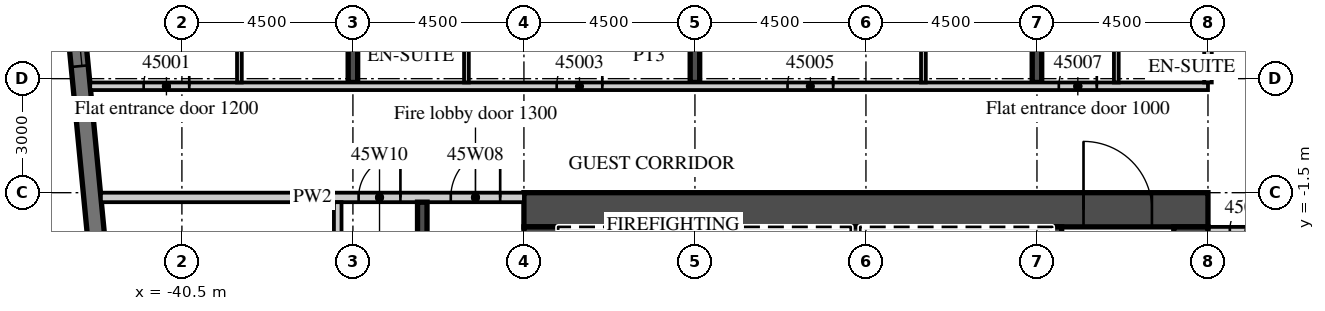
"""IFC4 building model, lengths in metres.
Left out: names, types, materials, properties, quantities, classifications, styles, units other than length and angle.
Written with IfcOpenShell. Run it as: python <this file> out.ifc"""

import sys

from ifc_helpers import new_model, si_unit, direction, frame, frame_2d, origin, place, context, subcontext, project, spatial, rectangle, extrude, element, fill, save


model = new_model("IFC4")
c1 = context("Model", 3, precision=1e-05, world=origin(), true_north=direction((0.0, 1.0)))
c2 = subcontext(c1, "Body", "Model", "MODEL_VIEW")
j1 = project(units=[si_unit("LENGTHUNIT", "METRE"), si_unit("PLANEANGLEUNIT", "RADIAN")], contexts=[c1])
p1 = place(None, origin())
s1 = spatial("IfcSite", under=j1, at=p1, CompositionType="ELEMENT")
p2 = place(p1, origin())
s2 = spatial("IfcBuilding", under=s1, at=p2, CompositionType="ELEMENT")
p3 = place(p2, frame((0.0, 0.0, 190.0)))
s3 = spatial("IfcBuildingStorey", under=s2, at=p3, CompositionType="ELEMENT", Elevation=190.0)
p4 = place(p3, frame((-36.0, 1.4, 0.0), z_axis=(0.0, 0.0, 1.0), x_axis=(0.0, 1.0, 0.0)))
e1 = element("IfcWall", 1, at=p4, inside=s3, PredefinedType="SHEAR", context=c2, shape_type="SweptSolid", body=[
    extrude(rectangle(XDim=15.401, YDim=0.25, at=frame_2d((7.701, 0.0))), origin(), (0.0, 0.0, 1.0), 3.3),
])
p5 = place(p3, frame((-27.0, 1.4, 0.0), z_axis=(0.0, 0.0, 1.0), x_axis=(0.0, 1.0, 0.0)))
e2 = element("IfcWall", 2, at=p5, inside=s3, PredefinedType="SHEAR", context=c2, shape_type="SweptSolid", body=[
    extrude(rectangle(XDim=16.268, YDim=0.25, at=frame_2d((8.134, 0.0))), origin(), (0.0, 0.0, 1.0), 3.3),
])
p6 = place(p3, frame((-18.0, 1.4, 0.0), z_axis=(0.0, 0.0, 1.0), x_axis=(0.0, 1.0, 0.0)))
e3 = element("IfcWall", 3, at=p6, inside=s3, PredefinedType="SHEAR", context=c2, shape_type="SweptSolid", body=[
    extrude(rectangle(XDim=17.134, YDim=0.25, at=frame_2d((8.567, 0.0))), origin(), (0.0, 0.0, 1.0), 3.3),
])
p7 = place(p3, frame((-44.214, 12.466, 0.0), z_axis=(0.0, 0.0, 1.0), x_axis=(0.095847314626, -0.995396047952, 0.0)))
e4 = element("IfcWall", 4, at=p7, inside=s3, PredefinedType="SOLIDWALL", context=c2, shape_type="SweptSolid", body=[
    extrude(rectangle(XDim=34.0, YDim=0.45, at=frame_2d((17.0, 0.0))), origin(), (0.0, 0.0, 1.0), 3.02),
])
p8 = place(p7, frame((2.865, 0.0, 0.45)))
e5 = element("IfcOpeningElement", 5, at=p8, cuts=e4, PredefinedType="OPENING", context=c2, shape_type="SweptSolid", body=[
    extrude(rectangle(XDim=3.3, YDim=2.25, at=frame_2d((1.65, 1.125))), frame((0.0, 0.235, 0.0), z_axis=(0.0, -1.0, 0.0), x_axis=(1.0, 0.0, 0.0)), (0.0, 0.0, 1.0), 0.47),
])
p9 = place(p7, frame((7.386, 0.0, 0.45)))
e6 = element("IfcOpeningElement", 6, at=p9, cuts=e4, PredefinedType="OPENING", context=c2, shape_type="SweptSolid", body=[
    extrude(rectangle(XDim=3.3, YDim=2.25, at=frame_2d((1.65, 1.125))), frame((0.0, 0.235, 0.0), z_axis=(0.0, -1.0, 0.0), x_axis=(1.0, 0.0, 0.0)), (0.0, 0.0, 1.0), 0.47),
])
p10 = place(p3, frame((-42.913, 1.3, 0.0), z_axis=(0.0, 0.0, 1.0), x_axis=(1.0, 0.0, 0.0)))
e7 = element("IfcWall", 7, at=p10, inside=s3, PredefinedType="PARTITIONING", context=c2, shape_type="SweptSolid", body=[
    extrude(rectangle(XDim=29.413, YDim=0.2, at=frame_2d((14.707, 0.0))), origin(), (0.0, 0.0, 1.0), 3.02),
])
p11 = place(p10, frame((1.406, 0.0, 0.0)))
e8 = element("IfcOpeningElement", 8, at=p11, cuts=e7, PredefinedType="OPENING", context=c2, shape_type="SweptSolid", body=[
    extrude(rectangle(XDim=1.2, YDim=2.1, at=frame_2d((0.6, 1.05))), frame((0.0, 0.11, 0.0), z_axis=(0.0, -1.0, 0.0), x_axis=(1.0, 0.0, 0.0)), (0.0, 0.0, 1.0), 0.22),
])
p12 = place(p10, frame((12.275, 0.0, 0.0)))
e9 = element("IfcOpeningElement", 9, at=p12, cuts=e7, PredefinedType="OPENING", context=c2, shape_type="SweptSolid", body=[
    extrude(rectangle(XDim=1.2, YDim=2.1, at=frame_2d((0.6, 1.05))), frame((0.0, 0.11, 0.0), z_axis=(0.0, -1.0, 0.0), x_axis=(1.0, 0.0, 0.0)), (0.0, 0.0, 1.0), 0.22),
])
p13 = place(p10, frame((18.35, 0.0, 0.0)))
e10 = element("IfcOpeningElement", 10, at=p13, cuts=e7, PredefinedType="OPENING", context=c2, shape_type="SweptSolid", body=[
    extrude(rectangle(XDim=1.2, YDim=2.1, at=frame_2d((0.6, 1.05))), frame((0.0, 0.11, 0.0), z_axis=(0.0, -1.0, 0.0), x_axis=(1.0, 0.0, 0.0)), (0.0, 0.0, 1.0), 0.22),
])
p14 = place(p10, frame((25.488, 0.0, 0.0)))
e11 = element("IfcOpeningElement", 11, at=p14, cuts=e7, PredefinedType="OPENING", context=c2, shape_type="SweptSolid", body=[
    extrude(rectangle(XDim=1.0, YDim=2.1, at=frame_2d((0.5, 1.05))), frame((0.0, 0.11, 0.0), z_axis=(0.0, -1.0, 0.0), x_axis=(1.0, 0.0, 0.0)), (0.0, 0.0, 1.0), 0.22),
])
p15 = place(p3, frame((-38.987, 1.4, 0.0), z_axis=(0.0, 0.0, 1.0), x_axis=(0.0, 1.0, 0.0)))
e12 = element("IfcWall", 12, at=p15, inside=s3, PredefinedType="PARTITIONING", context=c2, shape_type="SweptSolid", body=[
    extrude(rectangle(XDim=3.725, YDim=0.125, at=frame_2d((1.863, 0.0))), origin(), (0.0, 0.0, 1.0), 3.02),
])
p16 = place(p15, frame((2.45, 0.0, 0.0)))
e13 = element("IfcOpeningElement", 13, at=p16, cuts=e12, PredefinedType="OPENING", context=c2, shape_type="SweptSolid", body=[
    extrude(rectangle(XDim=0.9, YDim=2.1, at=frame_2d((0.45, 1.05))), frame((0.0, 0.073, 0.0), z_axis=(0.0, -1.0, 0.0), x_axis=(1.0, 0.0, 0.0)), (0.0, 0.0, 1.0), 0.145),
])
p17 = place(p3, frame((-33.013, 1.4, 0.0), z_axis=(0.0, 0.0, 1.0), x_axis=(0.0, 1.0, 0.0)))
e14 = element("IfcWall", 14, at=p17, inside=s3, PredefinedType="PARTITIONING", context=c2, shape_type="SweptSolid", body=[
    extrude(rectangle(XDim=3.725, YDim=0.125, at=frame_2d((1.863, 0.0))), origin(), (0.0, 0.0, 1.0), 3.02),
])
p18 = place(p17, frame((2.45, 0.0, 0.0)))
e15 = element("IfcOpeningElement", 15, at=p18, cuts=e14, PredefinedType="OPENING", context=c2, shape_type="SweptSolid", body=[
    extrude(rectangle(XDim=0.9, YDim=2.1, at=frame_2d((0.45, 1.05))), frame((0.0, 0.073, 0.0), z_axis=(0.0, -1.0, 0.0), x_axis=(1.0, 0.0, 0.0)), (0.0, 0.0, 1.0), 0.145),
])
p19 = place(p3, frame((-20.988, 1.4, 0.0), z_axis=(0.0, 0.0, 1.0), x_axis=(0.0, 1.0, 0.0)))
e16 = element("IfcWall", 16, at=p19, inside=s3, PredefinedType="PARTITIONING", context=c2, shape_type="SweptSolid", body=[
    extrude(rectangle(XDim=3.725, YDim=0.125, at=frame_2d((1.863, 0.0))), origin(), (0.0, 0.0, 1.0), 3.02),
])
p20 = place(p19, frame((2.45, 0.0, 0.0)))
e17 = element("IfcOpeningElement", 17, at=p20, cuts=e16, PredefinedType="OPENING", context=c2, shape_type="SweptSolid", body=[
    extrude(rectangle(XDim=0.9, YDim=2.1, at=frame_2d((0.45, 1.05))), frame((0.0, 0.073, 0.0), z_axis=(0.0, -1.0, 0.0), x_axis=(1.0, 0.0, 0.0)), (0.0, 0.0, 1.0), 0.145),
])
p21 = place(p3, frame((-13.5, 1.4, 0.0), z_axis=(0.0, 0.0, 1.0), x_axis=(0.0, 1.0, 0.0)))
e18 = element("IfcWall", 18, at=p21, inside=s3, PredefinedType="PARTITIONING", context=c2, shape_type="SweptSolid", body=[
    extrude(rectangle(XDim=17.59, YDim=0.2, at=frame_2d((8.795, 0.0))), origin(), (0.0, 0.0, 1.0), 3.02),
])
p22 = place(p3, frame((-15.912, 1.4, 0.0), z_axis=(0.0, 0.0, 1.0), x_axis=(0.0, 1.0, 0.0)))
e19 = element("IfcWall", 19, at=p22, inside=s3, PredefinedType="PARTITIONING", context=c2, shape_type="SweptSolid", body=[
    extrude(rectangle(XDim=3.725, YDim=0.125, at=frame_2d((1.863, 0.0))), origin(), (0.0, 0.0, 1.0), 3.02),
])
p23 = place(p22, frame((2.45, 0.0, 0.0)))
e20 = element("IfcOpeningElement", 20, at=p23, cuts=e19, PredefinedType="OPENING", context=c2, shape_type="SweptSolid", body=[
    extrude(rectangle(XDim=0.9, YDim=2.1, at=frame_2d((0.45, 1.05))), frame((0.0, 0.073, 0.0), z_axis=(0.0, -1.0, 0.0), x_axis=(1.0, 0.0, 0.0)), (0.0, 0.0, 1.0), 0.145),
])
p24 = place(p3, frame((-13.5, -2.5, 0.0), z_axis=(0.0, 0.0, 1.0), x_axis=(1.0, 0.0, 0.0)))
e21 = element("IfcWall", 21, at=p24, inside=s3, PredefinedType="PARTITIONING", context=c2, shape_type="SweptSolid", body=[
    extrude(rectangle(XDim=27.0, YDim=0.2, at=frame_2d((13.5, 0.0))), origin(), (0.0, 0.0, 1.0), 3.02),
])
p25 = place(p24, frame((0.575, 0.0, 0.0)))
e22 = element("IfcOpeningElement", 22, at=p25, cuts=e21, PredefinedType="OPENING", context=c2, shape_type="SweptSolid", body=[
    extrude(rectangle(XDim=1.0, YDim=2.1, at=frame_2d((0.5, 1.05))), frame((0.0, 0.11, 0.0), z_axis=(0.0, -1.0, 0.0), x_axis=(1.0, 0.0, 0.0)), (0.0, 0.0, 1.0), 0.22),
])
p26 = place(p24, frame((7.45, 0.0, 0.0)))
e23 = element("IfcOpeningElement", 23, at=p26, cuts=e21, PredefinedType="OPENING", context=c2, shape_type="SweptSolid", body=[
    extrude(rectangle(XDim=1.0, YDim=2.1, at=frame_2d((0.5, 1.05))), frame((0.0, 0.11, 0.0), z_axis=(0.0, -1.0, 0.0), x_axis=(1.0, 0.0, 0.0)), (0.0, 0.0, 1.0), 0.22),
])
p27 = place(p24, frame((9.55, 0.0, 0.0)))
e24 = element("IfcOpeningElement", 24, at=p27, cuts=e21, PredefinedType="OPENING", context=c2, shape_type="SweptSolid", body=[
    extrude(rectangle(XDim=1.0, YDim=2.1, at=frame_2d((0.5, 1.05))), frame((0.0, 0.11, 0.0), z_axis=(0.0, -1.0, 0.0), x_axis=(1.0, 0.0, 0.0)), (0.0, 0.0, 1.0), 0.22),
])
p28 = place(p24, frame((18.862, 0.0, 0.0)))
e25 = element("IfcOpeningElement", 25, at=p28, cuts=e21, PredefinedType="OPENING", context=c2, shape_type="SweptSolid", body=[
    extrude(rectangle(XDim=1.2, YDim=2.1, at=frame_2d((0.6, 1.05))), frame((0.0, 0.11, 0.0), z_axis=(0.0, -1.0, 0.0), x_axis=(1.0, 0.0, 0.0)), (0.0, 0.0, 1.0), 0.22),
])
p29 = place(p24, frame((23.075, 0.0, 0.0)))
e26 = element("IfcOpeningElement", 26, at=p29, cuts=e21, PredefinedType="OPENING", context=c2, shape_type="SweptSolid", body=[
    extrude(rectangle(XDim=1.0, YDim=2.1, at=frame_2d((0.5, 1.05))), frame((0.0, 0.11, 0.0), z_axis=(0.0, -1.0, 0.0), x_axis=(1.0, 0.0, 0.0)), (0.0, 0.0, 1.0), 0.22),
])
p30 = place(p3, frame((-31.5, -1.95, 0.0), z_axis=(0.0, 0.0, 1.0), x_axis=(1.0, 0.0, 0.0)))
e27 = element("IfcWall", 27, at=p30, inside=s3, PredefinedType="SHEAR", context=c2, shape_type="SweptSolid", body=[
    extrude(rectangle(XDim=18.0, YDim=0.9, at=frame_2d((9.0, 0.0))), origin(), (0.0, 0.0, 1.0), 3.02),
])
p31 = place(p30, frame((14.725, 0.0, 0.0)))
e28 = element("IfcOpeningElement", 28, at=p31, cuts=e27, PredefinedType="OPENING", context=c2, shape_type="SweptSolid", body=[
    extrude(rectangle(XDim=1.8, YDim=2.1, at=frame_2d((0.9, 1.05))), frame((0.0, 0.46, 0.0), z_axis=(0.0, -1.0, 0.0), x_axis=(1.0, 0.0, 0.0)), (0.0, 0.0, 1.0), 0.92),
])
p32 = place(p3, frame((-31.05, -15.2, 0.0), z_axis=(0.0, 0.0, 1.0), x_axis=(0.0, 1.0, 0.0)))
e29 = element("IfcWall", 29, at=p32, inside=s3, PredefinedType="SHEAR", context=c2, shape_type="SweptSolid", body=[
    extrude(rectangle(XDim=12.8, YDim=0.9, at=frame_2d((6.4, 0.0))), origin(), (0.0, 0.0, 1.0), 3.02),
])
p33 = place(p32, frame((11.5, 0.0, 0.0)))
e30 = element("IfcOpeningElement", 30, at=p33, cuts=e29, PredefinedType="OPENING", context=c2, shape_type="SweptSolid", body=[
    extrude(rectangle(XDim=1.1, YDim=2.1, at=frame_2d((0.55, 1.05))), frame((0.0, 0.46, 0.0), z_axis=(0.0, -1.0, 0.0), x_axis=(1.0, 0.0, 0.0)), (0.0, 0.0, 1.0), 0.92),
])
p34 = place(p3, frame((-13.95, -14.6, 0.0), z_axis=(0.0, 0.0, 1.0), x_axis=(0.0, 1.0, 0.0)))
e31 = element("IfcWall", 31, at=p34, inside=s3, PredefinedType="SHEAR", context=c2, shape_type="SweptSolid", body=[
    extrude(rectangle(XDim=12.2, YDim=0.9, at=frame_2d((6.1, 0.0))), origin(), (0.0, 0.0, 1.0), 3.02),
])
p35 = place(p3, frame((-17.475, -5.55, 0.0), z_axis=(0.0, 0.0, 1.0), x_axis=(0.0, 1.0, 0.0)))
e32 = element("IfcWall", 32, at=p35, inside=s3, PredefinedType="SHEAR", context=c2, shape_type="SweptSolid", body=[
    extrude(rectangle(XDim=3.15, YDim=0.25, at=frame_2d((1.575, 0.0))), origin(), (0.0, 0.0, 1.0), 3.02),
])
for number, where, z_axis, x_axis in (
    (33, (-27.975, -5.3, 0.0), (0.0, 0.0, 1.0), (0.0, 1.0, 0.0)),
    (34, (-22.775, -5.3, 0.0), (0.0, 0.0, 1.0), (0.0, 1.0, 0.0)),
):
    element("IfcWall", number, at=place(p3, frame(where, z_axis=z_axis, x_axis=x_axis)), inside=s3, PredefinedType="SHEAR", context=c2, shape_type="SweptSolid", body=[
        extrude(rectangle(XDim=2.9, YDim=0.25, at=frame_2d((1.45, 0.0))), origin(), (0.0, 0.0, 1.0), 3.02),
    ])
p36 = place(p3, frame((-42.632, -1.625, 0.0), z_axis=(0.0, 0.0, 1.0), x_axis=(1.0, 0.0, 0.0)))
e35 = element("IfcWall", 35, at=p36, inside=s3, PredefinedType="PARTITIONING", context=c2, shape_type="SweptSolid", body=[
    extrude(rectangle(XDim=11.132, YDim=0.25, at=frame_2d((5.566, 0.0))), origin(), (0.0, 0.0, 1.0), 3.02),
])
p37 = place(p36, frame((9.207, 0.0, 0.0)))
e36 = element("IfcOpeningElement", 36, at=p37, cuts=e35, PredefinedType="OPENING", context=c2, shape_type="SweptSolid", body=[
    extrude(rectangle(XDim=1.3, YDim=2.1, at=frame_2d((0.65, 1.05))), frame((0.0, 0.135, 0.0), z_axis=(0.0, -1.0, 0.0), x_axis=(1.0, 0.0, 0.0)), (0.0, 0.0, 1.0), 0.27),
])
p38 = place(p36, frame((6.781, 0.0, 0.0)))
e37 = element("IfcOpeningElement", 37, at=p38, cuts=e35, PredefinedType="OPENING", context=c2, shape_type="SweptSolid", body=[
    extrude(rectangle(XDim=1.1, YDim=2.1, at=frame_2d((0.55, 1.05))), frame((0.0, 0.135, 0.0), z_axis=(0.0, -1.0, 0.0), x_axis=(1.0, 0.0, 0.0)), (0.0, 0.0, 1.0), 0.27),
])
p39 = place(p3, frame((-34.175, -10.1, 0.0), z_axis=(0.0, 0.0, 1.0), x_axis=(0.0, 1.0, 0.0)))
e38 = element("IfcWall", 38, at=p39, inside=s3, PredefinedType="SHEAR", context=c2, shape_type="SweptSolid", body=[
    extrude(rectangle(XDim=8.35, YDim=0.25, at=frame_2d((4.175, 0.0))), origin(), (0.0, 0.0, 1.0), 3.02),
])
p40 = place(p3, frame((-36.4, -17.7, 0.0), z_axis=(0.0, 0.0, 1.0), x_axis=(0.0, 1.0, 0.0)))
e39 = element("IfcWall", 39, at=p40, inside=s3, PredefinedType="PARTITIONING", context=c2, shape_type="SweptSolid", body=[
    extrude(rectangle(XDim=15.95, YDim=0.2, at=frame_2d((7.975, 0.0))), origin(), (0.0, 0.0, 1.0), 3.02),
])
p41 = place(p40, frame((0.35, 0.0, 0.0)))
e40 = element("IfcOpeningElement", 40, at=p41, cuts=e39, PredefinedType="OPENING", context=c2, shape_type="SweptSolid", body=[
    extrude(rectangle(XDim=0.9, YDim=2.1, at=frame_2d((0.45, 1.05))), frame((0.0, 0.11, 0.0), z_axis=(0.0, -1.0, 0.0), x_axis=(1.0, 0.0, 0.0)), (0.0, 0.0, 1.0), 0.22),
])
p42 = place(p9, origin())
e41 = element("IfcWindow", 41, at=p42, inside=s3, PartitioningType="SINGLE_PANEL", PredefinedType="WINDOW", context=c2, shape_type="SweptSolid", body=[
    extrude(rectangle(XDim=3.3, YDim=2.25, at=frame_2d((1.65, 1.125))), frame((0.0, 0.09, 0.0), z_axis=(0.0, -1.0, 0.0), x_axis=(1.0, 0.0, 0.0)), (0.0, 0.0, 1.0), 0.06),
])
fill(e6, e41)
p43 = place(p11, origin())
e42 = element("IfcDoor", 42, at=p43, inside=s3, OperationType="SINGLE_SWING_RIGHT", PredefinedType="DOOR", context=c2, shape_type="SweptSolid", body=[
    extrude(rectangle(XDim=1.2, YDim=2.1, at=frame_2d((0.6, 1.05))), frame((0.0, 0.025, 0.0), z_axis=(0.0, -1.0, 0.0), x_axis=(1.0, 0.0, 0.0)), (0.0, 0.0, 1.0), 0.05),
])
fill(e8, e42)
p44 = place(p12, origin())
e43 = element("IfcDoor", 43, at=p44, inside=s3, OperationType="SINGLE_SWING_RIGHT", PredefinedType="DOOR", context=c2, shape_type="SweptSolid", body=[
    extrude(rectangle(XDim=1.2, YDim=2.1, at=frame_2d((0.6, 1.05))), frame((0.0, 0.025, 0.0), z_axis=(0.0, -1.0, 0.0), x_axis=(1.0, 0.0, 0.0)), (0.0, 0.0, 1.0), 0.05),
])
fill(e9, e43)
p45 = place(p13, origin())
e44 = element("IfcDoor", 44, at=p45, inside=s3, OperationType="SINGLE_SWING_RIGHT", PredefinedType="DOOR", context=c2, shape_type="SweptSolid", body=[
    extrude(rectangle(XDim=1.2, YDim=2.1, at=frame_2d((0.6, 1.05))), frame((0.0, 0.025, 0.0), z_axis=(0.0, -1.0, 0.0), x_axis=(1.0, 0.0, 0.0)), (0.0, 0.0, 1.0), 0.05),
])
fill(e10, e44)
p46 = place(p14, origin())
e45 = element("IfcDoor", 45, at=p46, inside=s3, OperationType="SINGLE_SWING_RIGHT", PredefinedType="DOOR", context=c2, shape_type="SweptSolid", body=[
    extrude(rectangle(XDim=1.0, YDim=2.1, at=frame_2d((0.5, 1.05))), frame((0.0, 0.025, 0.0), z_axis=(0.0, -1.0, 0.0), x_axis=(1.0, 0.0, 0.0)), (0.0, 0.0, 1.0), 0.05),
])
fill(e11, e45)
p47 = place(p25, origin())
e46 = element("IfcDoor", 46, at=p47, inside=s3, OperationType="SINGLE_SWING_RIGHT", PredefinedType="DOOR", context=c2, shape_type="SweptSolid", body=[
    extrude(rectangle(XDim=1.0, YDim=2.1, at=frame_2d((0.5, 1.05))), frame((0.0, 0.025, 0.0), z_axis=(0.0, -1.0, 0.0), x_axis=(1.0, 0.0, 0.0)), (0.0, 0.0, 1.0), 0.05),
])
fill(e22, e46)
p48 = place(p31, origin())
e47 = element("IfcDoor", 47, at=p48, inside=s3, OperationType="DOUBLE_DOOR_DOUBLE_SWING", PredefinedType="DOOR", context=c2, shape_type="SweptSolid", body=[
    extrude(rectangle(XDim=1.8, YDim=2.1, at=frame_2d((0.9, 1.05))), frame((0.0, 0.025, 0.0), z_axis=(0.0, -1.0, 0.0), x_axis=(1.0, 0.0, 0.0)), (0.0, 0.0, 1.0), 0.05),
])
fill(e28, e47)
p49 = place(p37, origin())
e48 = element("IfcDoor", 48, at=p49, inside=s3, OperationType="SINGLE_SWING_RIGHT", PredefinedType="DOOR", context=c2, shape_type="SweptSolid", body=[
    extrude(rectangle(XDim=1.3, YDim=2.1, at=frame_2d((0.65, 1.05))), frame((0.0, 0.025, 0.0), z_axis=(0.0, -1.0, 0.0), x_axis=(1.0, 0.0, 0.0)), (0.0, 0.0, 1.0), 0.05),
])
fill(e36, e48)
p50 = place(p38, origin())
e49 = element("IfcDoor", 49, at=p50, inside=s3, OperationType="SINGLE_SWING_RIGHT", PredefinedType="DOOR", context=c2, shape_type="SweptSolid", body=[
    extrude(rectangle(XDim=1.1, YDim=2.1, at=frame_2d((0.55, 1.05))), frame((0.0, 0.025, 0.0), z_axis=(0.0, -1.0, 0.0), x_axis=(1.0, 0.0, 0.0)), (0.0, 0.0, 1.0), 0.05),
])
fill(e37, e49)
save(model, sys.argv[1])
